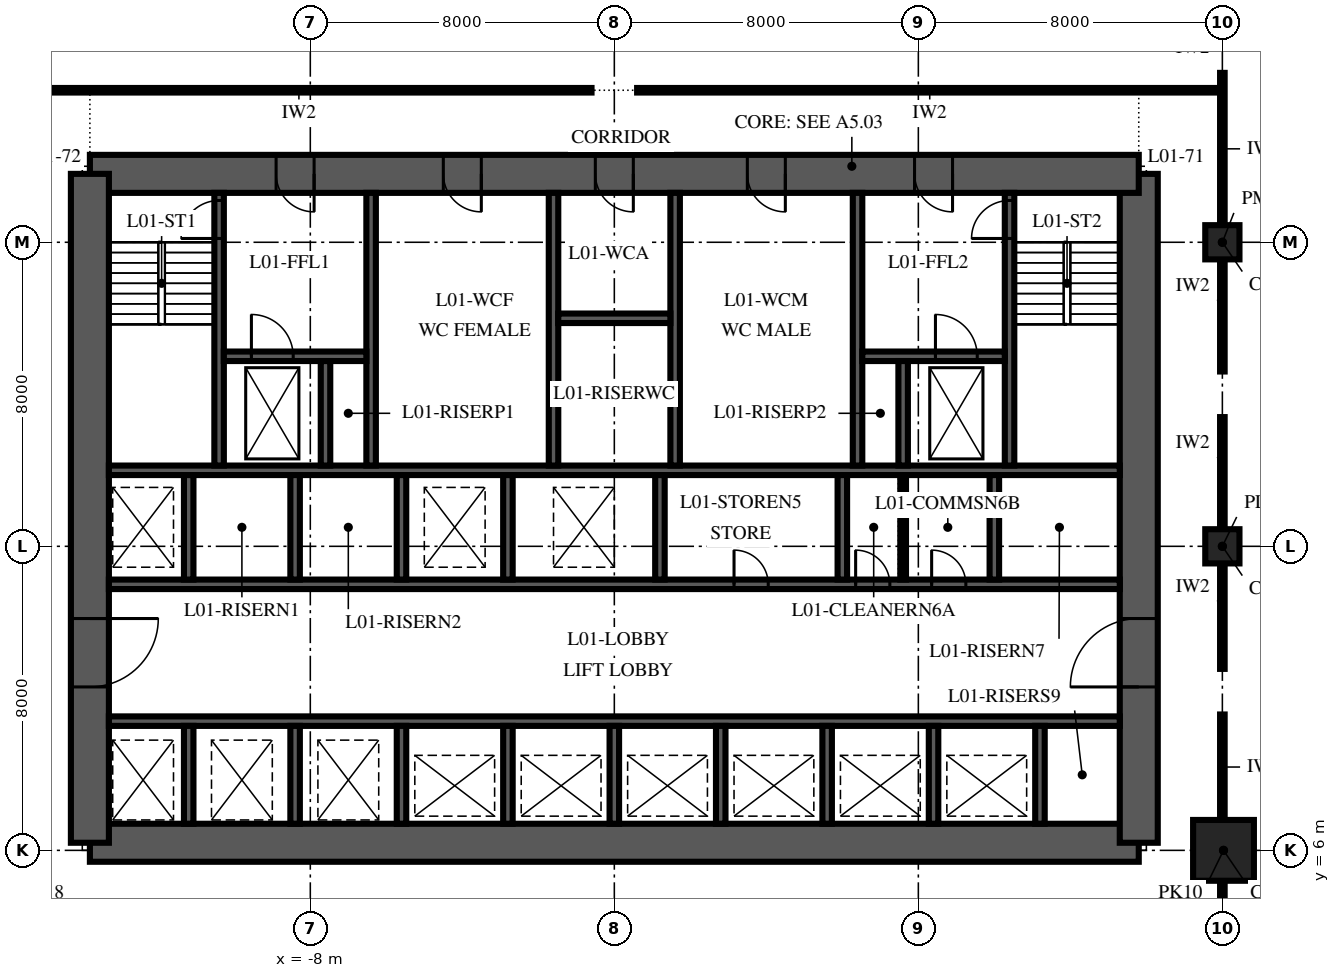
"""IFC4 building model, lengths in metres.
Left out: names, types, materials, properties, quantities, classifications, styles, units other than length and angle.
Written with IfcOpenShell. Run it as: python <this file> out.ifc"""

import sys

from ifc_helpers import new_model, si_unit, direction, frame, frame_2d, origin, origin_2d, place, context, subcontext, project, spatial, polyline, rectangle, outline, extrude, element, fill, save


model = new_model("IFC4")
c1 = context("Model", 3, precision=1e-05, world=origin(), true_north=direction((0.0, 1.0)))
c2 = subcontext(c1, "Body", "Model", "MODEL_VIEW")
j1 = project(units=[si_unit("LENGTHUNIT", "METRE"), si_unit("PLANEANGLEUNIT", "RADIAN")], contexts=[c1])
p1 = place(None, origin())
s1 = spatial("IfcSite", under=j1, at=p1, CompositionType="ELEMENT")
p2 = place(p1, origin())
s2 = spatial("IfcBuilding", under=s1, at=p2, CompositionType="ELEMENT")
p3 = place(p2, frame((0.0, 0.0, 6.0)))
s3 = spatial("IfcBuildingStorey", under=s2, at=p3, CompositionType="ELEMENT", Elevation=6.0)
p4 = place(p3, frame((16.03, 6.0, 0.0), z_axis=(0.0, 0.0, 1.0), x_axis=(1.0, 0.0, 0.0)))
e1 = element("IfcColumn", 1, at=p4, inside=s3, PredefinedType="COLUMN", context=c2, shape_type="SweptSolid", body=[
    extrude(rectangle(XDim=1.6, YDim=1.6, at=origin_2d()), origin(), (0.0, 0.0, 1.0), 6.0),
])
for number, where, z_axis, x_axis in (
    (2, (16.0, 14.0, 0.0), (0.0, 0.0, 1.0), (1.0, 0.0, 0.0)),
    (3, (16.0, 22.0, 0.0), (0.0, 0.0, 1.0), (1.0, 0.0, 0.0)),
):
    element("IfcColumn", number, at=place(p3, frame(where, z_axis=z_axis, x_axis=x_axis)), inside=s3, PredefinedType="COLUMN", context=c2, shape_type="SweptSolid", body=[
        extrude(rectangle(XDim=0.9, YDim=0.9, at=origin_2d()), origin(), (0.0, 0.0, 1.0), 6.0),
    ])
p5 = place(p3, frame((-13.8, 6.2, 0.0), z_axis=(0.0, 0.0, 1.0), x_axis=(1.0, 0.0, 0.0)))
e4 = element("IfcWall", 4, at=p5, inside=s3, PredefinedType="SHEAR", context=c2, shape_type="SweptSolid", body=[
    extrude(rectangle(XDim=27.6, YDim=1.0, at=frame_2d((13.8, 0.0))), origin(), (0.0, 0.0, 1.0), 6.0),
])
p6 = place(p3, frame((13.8, 6.2, 0.0), z_axis=(0.0, 0.0, 1.0), x_axis=(0.0, 1.0, 0.0)))
e5 = element("IfcWall", 5, at=p6, inside=s3, PredefinedType="SHEAR", context=c2, shape_type="SweptSolid", body=[
    extrude(outline(polyline([(0.0, -0.5), (17.6, -0.5), (17.6, 0.0), (17.1, 0.0), (17.1, 0.5), (0.5, 0.5), (0.5, 0.0), (0.0, 0.0), (0.0, -0.5)])), origin(), (0.0, 0.0, 1.0), 6.0),
])
p7 = place(p6, frame((4.1, 0.0, 0.0)))
e6 = element("IfcOpeningElement", 6, at=p7, cuts=e5, PredefinedType="OPENING", context=c2, shape_type="SweptSolid", body=[
    extrude(rectangle(XDim=1.8, YDim=2.4, at=frame_2d((0.9, 1.2))), frame((0.0, 0.515, 0.0), z_axis=(0.0, -1.0, 0.0), x_axis=(1.0, 0.0, 0.0)), (0.0, 0.0, 1.0), 1.03),
])
p8 = place(p3, frame((13.8, 23.8, 0.0), z_axis=(0.0, 0.0, 1.0), x_axis=(-1.0, 0.0, 0.0)))
e7 = element("IfcWall", 7, at=p8, inside=s3, PredefinedType="SHEAR", context=c2, shape_type="SweptSolid", body=[
    extrude(rectangle(XDim=27.6, YDim=1.0, at=frame_2d((13.8, 0.0))), origin(), (0.0, 0.0, 1.0), 6.0),
])
p9 = place(p8, frame((21.7, 0.0, 0.0)))
e8 = element("IfcOpeningElement", 8, at=p9, cuts=e7, PredefinedType="OPENING", context=c2, shape_type="SweptSolid", body=[
    extrude(rectangle(XDim=1.0, YDim=2.1, at=frame_2d((0.5, 1.05))), frame((0.0, 0.515, 0.0), z_axis=(0.0, -1.0, 0.0), x_axis=(1.0, 0.0, 0.0)), (0.0, 0.0, 1.0), 1.03),
])
p10 = place(p8, frame((4.9, 0.0, 0.0)))
e9 = element("IfcOpeningElement", 9, at=p10, cuts=e7, PredefinedType="OPENING", context=c2, shape_type="SweptSolid", body=[
    extrude(rectangle(XDim=1.0, YDim=2.1, at=frame_2d((0.5, 1.05))), frame((0.0, 0.515, 0.0), z_axis=(0.0, -1.0, 0.0), x_axis=(1.0, 0.0, 0.0)), (0.0, 0.0, 1.0), 1.03),
])
p11 = place(p8, frame((17.3, 0.0, 0.0)))
e10 = element("IfcOpeningElement", 10, at=p11, cuts=e7, PredefinedType="OPENING", context=c2, shape_type="SweptSolid", body=[
    extrude(rectangle(XDim=1.0, YDim=2.1, at=frame_2d((0.5, 1.05))), frame((0.0, 0.515, 0.0), z_axis=(0.0, -1.0, 0.0), x_axis=(1.0, 0.0, 0.0)), (0.0, 0.0, 1.0), 1.03),
])
p12 = place(p8, frame((13.3, 0.0, 0.0)))
e11 = element("IfcOpeningElement", 11, at=p12, cuts=e7, PredefinedType="OPENING", context=c2, shape_type="SweptSolid", body=[
    extrude(rectangle(XDim=1.0, YDim=2.1, at=frame_2d((0.5, 1.05))), frame((0.0, 0.515, 0.0), z_axis=(0.0, -1.0, 0.0), x_axis=(1.0, 0.0, 0.0)), (0.0, 0.0, 1.0), 1.03),
])
p13 = place(p8, frame((9.3, 0.0, 0.0)))
e12 = element("IfcOpeningElement", 12, at=p13, cuts=e7, PredefinedType="OPENING", context=c2, shape_type="SweptSolid", body=[
    extrude(rectangle(XDim=1.0, YDim=2.1, at=frame_2d((0.5, 1.05))), frame((0.0, 0.515, 0.0), z_axis=(0.0, -1.0, 0.0), x_axis=(1.0, 0.0, 0.0)), (0.0, 0.0, 1.0), 1.03),
])
p14 = place(p3, frame((-13.8, 23.8, 0.0), z_axis=(0.0, 0.0, 1.0), x_axis=(0.0, -1.0, 0.0)))
e13 = element("IfcWall", 13, at=p14, inside=s3, PredefinedType="SHEAR", context=c2, shape_type="SweptSolid", body=[
    extrude(outline(polyline([(0.0, -0.5), (17.6, -0.5), (17.6, 0.0), (17.1, 0.0), (17.1, 0.5), (0.5, 0.5), (0.5, 0.0), (0.0, 0.0), (0.0, -0.5)])), origin(), (0.0, 0.0, 1.0), 6.0),
])
p15 = place(p14, frame((11.7, 0.0, 0.0)))
e14 = element("IfcOpeningElement", 14, at=p15, cuts=e13, PredefinedType="OPENING", context=c2, shape_type="SweptSolid", body=[
    extrude(rectangle(XDim=1.8, YDim=2.4, at=frame_2d((0.9, 1.2))), frame((0.0, 0.515, 0.0), z_axis=(0.0, -1.0, 0.0), x_axis=(1.0, 0.0, 0.0)), (0.0, 0.0, 1.0), 1.03),
])
p16 = place(p3, frame((-13.3, 9.4, 0.0), z_axis=(0.0, 0.0, 1.0), x_axis=(1.0, 0.0, 0.0)))
e15 = element("IfcWall", 15, at=p16, inside=s3, PredefinedType="SHEAR", context=c2, shape_type="SweptSolid", body=[
    extrude(rectangle(XDim=26.6, YDim=0.25, at=frame_2d((13.3, 0.0))), origin(), (0.0, 0.0, 1.0), 6.0),
])
p17 = place(p3, frame((-13.3, 13.0, 0.0), z_axis=(0.0, 0.0, 1.0), x_axis=(1.0, 0.0, 0.0)))
e16 = element("IfcWall", 16, at=p17, inside=s3, PredefinedType="SHEAR", context=c2, shape_type="SweptSolid", body=[
    extrude(rectangle(XDim=26.6, YDim=0.25, at=frame_2d((13.3, 0.0))), origin(), (0.0, 0.0, 1.0), 6.0),
])
p18 = place(p17, frame((16.45, 0.0, 0.0)))
e17 = element("IfcOpeningElement", 17, at=p18, cuts=e16, PredefinedType="OPENING", context=c2, shape_type="SweptSolid", body=[
    extrude(rectangle(XDim=0.9, YDim=2.1, at=frame_2d((0.45, 1.05))), frame((0.0, 0.14, 0.0), z_axis=(0.0, -1.0, 0.0), x_axis=(1.0, 0.0, 0.0)), (0.0, 0.0, 1.0), 0.28),
])
p19 = place(p17, frame((19.65, 0.0, 0.0)))
e18 = element("IfcOpeningElement", 18, at=p19, cuts=e16, PredefinedType="OPENING", context=c2, shape_type="SweptSolid", body=[
    extrude(rectangle(XDim=0.9, YDim=2.1, at=frame_2d((0.45, 1.05))), frame((0.0, 0.14, 0.0), z_axis=(0.0, -1.0, 0.0), x_axis=(1.0, 0.0, 0.0)), (0.0, 0.0, 1.0), 0.28),
])
p20 = place(p17, frame((21.65, 0.0, 0.0)))
e19 = element("IfcOpeningElement", 19, at=p20, cuts=e16, PredefinedType="OPENING", context=c2, shape_type="SweptSolid", body=[
    extrude(rectangle(XDim=0.9, YDim=2.1, at=frame_2d((0.45, 1.05))), frame((0.0, 0.14, 0.0), z_axis=(0.0, -1.0, 0.0), x_axis=(1.0, 0.0, 0.0)), (0.0, 0.0, 1.0), 0.28),
])
p21 = place(p3, frame((-13.3, 16.0, 0.0), z_axis=(0.0, 0.0, 1.0), x_axis=(1.0, 0.0, 0.0)))
e20 = element("IfcWall", 20, at=p21, inside=s3, PredefinedType="SHEAR", context=c2, shape_type="SweptSolid", body=[
    extrude(rectangle(XDim=26.6, YDim=0.25, at=frame_2d((13.3, 0.0))), origin(), (0.0, 0.0, 1.0), 6.0),
])
for number, where, z_axis, x_axis in (
    (21, (-11.2, 6.7, 0.0), (0.0, 0.0, 1.0), (0.0, 1.0, 0.0)),
    (22, (-8.4, 6.7, 0.0), (0.0, 0.0, 1.0), (0.0, 1.0, 0.0)),
    (23, (-5.6, 6.7, 0.0), (0.0, 0.0, 1.0), (0.0, 1.0, 0.0)),
    (24, (-2.8, 6.7, 0.0), (0.0, 0.0, 1.0), (0.0, 1.0, 0.0)),
    (25, (0.0, 6.7, 0.0), (0.0, 0.0, 1.0), (0.0, 1.0, 0.0)),
    (26, (2.8, 6.7, 0.0), (0.0, 0.0, 1.0), (0.0, 1.0, 0.0)),
    (27, (5.6, 6.7, 0.0), (0.0, 0.0, 1.0), (0.0, 1.0, 0.0)),
    (28, (8.4, 6.7, 0.0), (0.0, 0.0, 1.0), (0.0, 1.0, 0.0)),
    (29, (11.2, 6.7, 0.0), (0.0, 0.0, 1.0), (0.0, 1.0, 0.0)),
):
    element("IfcWall", number, at=place(p3, frame(where, z_axis=z_axis, x_axis=x_axis)), inside=s3, PredefinedType="SHEAR", context=c2, shape_type="SweptSolid", body=[
        extrude(rectangle(XDim=2.575, YDim=0.25, at=frame_2d((1.288, 0.0))), origin(), (0.0, 0.0, 1.0), 6.0),
    ])
for number, where, z_axis, x_axis in (
    (30, (-11.2, 13.125, 0.0), (0.0, 0.0, 1.0), (0.0, 1.0, 0.0)),
    (31, (-8.4, 13.125, 0.0), (0.0, 0.0, 1.0), (0.0, 1.0, 0.0)),
    (32, (-5.6, 13.125, 0.0), (0.0, 0.0, 1.0), (0.0, 1.0, 0.0)),
    (33, (-2.8, 13.125, 0.0), (0.0, 0.0, 1.0), (0.0, 1.0, 0.0)),
    (34, (1.2, 13.125, 0.0), (0.0, 0.0, 1.0), (0.0, 1.0, 0.0)),
    (35, (6.0, 13.125, 0.0), (0.0, 0.0, 1.0), (0.0, 1.0, 0.0)),
    (36, (10.0, 13.125, 0.0), (0.0, 0.0, 1.0), (0.0, 1.0, 0.0)),
):
    element("IfcWall", number, at=place(p3, frame(where, z_axis=z_axis, x_axis=x_axis)), inside=s3, PredefinedType="SHEAR", context=c2, shape_type="SweptSolid", body=[
        extrude(rectangle(XDim=2.75, YDim=0.25, at=frame_2d((1.375, 0.0))), origin(), (0.0, 0.0, 1.0), 6.0),
    ])
p22 = place(p3, frame((-10.4, 16.125, 0.0), z_axis=(0.0, 0.0, 1.0), x_axis=(0.0, 1.0, 0.0)))
e37 = element("IfcWall", 37, at=p22, inside=s3, PredefinedType="SHEAR", context=c2, shape_type="SweptSolid", body=[
    extrude(rectangle(XDim=7.175, YDim=0.25, at=frame_2d((3.587, 0.0))), origin(), (0.0, 0.0, 1.0), 6.0),
])
p23 = place(p22, frame((5.975, 0.0, 0.0)))
e38 = element("IfcOpeningElement", 38, at=p23, cuts=e37, PredefinedType="OPENING", context=c2, shape_type="SweptSolid", body=[
    extrude(rectangle(XDim=1.0, YDim=2.1, at=frame_2d((0.5, 1.05))), frame((0.0, 0.14, 0.0), z_axis=(0.0, -1.0, 0.0), x_axis=(1.0, 0.0, 0.0)), (0.0, 0.0, 1.0), 0.28),
])
for number, where, z_axis, x_axis in (
    (39, (-6.4, 16.125, 0.0), (0.0, 0.0, 1.0), (0.0, 1.0, 0.0)),
    (40, (-1.6, 16.125, 0.0), (0.0, 0.0, 1.0), (0.0, 1.0, 0.0)),
    (41, (1.6, 16.125, 0.0), (0.0, 0.0, 1.0), (0.0, 1.0, 0.0)),
    (42, (6.4, 16.125, 0.0), (0.0, 0.0, 1.0), (0.0, 1.0, 0.0)),
):
    element("IfcWall", number, at=place(p3, frame(where, z_axis=z_axis, x_axis=x_axis)), inside=s3, PredefinedType="SHEAR", context=c2, shape_type="SweptSolid", body=[
        extrude(rectangle(XDim=7.175, YDim=0.25, at=frame_2d((3.587, 0.0))), origin(), (0.0, 0.0, 1.0), 6.0),
    ])
p24 = place(p3, frame((10.4, 16.125, 0.0), z_axis=(0.0, 0.0, 1.0), x_axis=(0.0, 1.0, 0.0)))
e43 = element("IfcWall", 43, at=p24, inside=s3, PredefinedType="SHEAR", context=c2, shape_type="SweptSolid", body=[
    extrude(rectangle(XDim=7.175, YDim=0.25, at=frame_2d((3.587, 0.0))), origin(), (0.0, 0.0, 1.0), 6.0),
])
p25 = place(p24, frame((5.975, 0.0, 0.0)))
e44 = element("IfcOpeningElement", 44, at=p25, cuts=e43, PredefinedType="OPENING", context=c2, shape_type="SweptSolid", body=[
    extrude(rectangle(XDim=1.0, YDim=2.1, at=frame_2d((0.5, 1.05))), frame((0.0, 0.14, 0.0), z_axis=(0.0, -1.0, 0.0), x_axis=(1.0, 0.0, 0.0)), (0.0, 0.0, 1.0), 0.28),
])
p26 = place(p3, frame((-10.275, 19.0, 0.0), z_axis=(0.0, 0.0, 1.0), x_axis=(1.0, 0.0, 0.0)))
e45 = element("IfcWall", 45, at=p26, inside=s3, PredefinedType="SHEAR", context=c2, shape_type="SweptSolid", body=[
    extrude(rectangle(XDim=3.75, YDim=0.25, at=frame_2d((1.875, 0.0))), origin(), (0.0, 0.0, 1.0), 6.0),
])
p27 = place(p26, frame((0.725, 0.0, 0.0)))
e46 = element("IfcOpeningElement", 46, at=p27, cuts=e45, PredefinedType="OPENING", context=c2, shape_type="SweptSolid", body=[
    extrude(rectangle(XDim=1.1, YDim=2.1, at=frame_2d((0.55, 1.05))), frame((0.0, 0.14, 0.0), z_axis=(0.0, -1.0, 0.0), x_axis=(1.0, 0.0, 0.0)), (0.0, 0.0, 1.0), 0.28),
])
p28 = place(p3, frame((6.525, 19.0, 0.0), z_axis=(0.0, 0.0, 1.0), x_axis=(1.0, 0.0, 0.0)))
e47 = element("IfcWall", 47, at=p28, inside=s3, PredefinedType="SHEAR", context=c2, shape_type="SweptSolid", body=[
    extrude(rectangle(XDim=3.75, YDim=0.25, at=frame_2d((1.875, 0.0))), origin(), (0.0, 0.0, 1.0), 6.0),
])
p29 = place(p28, frame((1.925, 0.0, 0.0)))
e48 = element("IfcOpeningElement", 48, at=p29, cuts=e47, PredefinedType="OPENING", context=c2, shape_type="SweptSolid", body=[
    extrude(rectangle(XDim=1.1, YDim=2.1, at=frame_2d((0.55, 1.05))), frame((0.0, 0.14, 0.0), z_axis=(0.0, -1.0, 0.0), x_axis=(1.0, 0.0, 0.0)), (0.0, 0.0, 1.0), 0.28),
])
for number, where, z_axis, x_axis in (
    (49, (-7.6, 16.125, 0.0), (0.0, 0.0, 1.0), (0.0, 1.0, 0.0)),
    (50, (7.6, 16.125, 0.0), (0.0, 0.0, 1.0), (0.0, 1.0, 0.0)),
):
    element("IfcWall", number, at=place(p3, frame(where, z_axis=z_axis, x_axis=x_axis)), inside=s3, PredefinedType="SHEAR", context=c2, shape_type="SweptSolid", body=[
        extrude(rectangle(XDim=2.75, YDim=0.25, at=frame_2d((1.375, 0.0))), origin(), (0.0, 0.0, 1.0), 6.0),
    ])
p30 = place(p3, frame((-1.475, 20.0, 0.0), z_axis=(0.0, 0.0, 1.0), x_axis=(1.0, 0.0, 0.0)))
e51 = element("IfcWall", 51, at=p30, inside=s3, PredefinedType="SHEAR", context=c2, shape_type="SweptSolid", body=[
    extrude(rectangle(XDim=2.95, YDim=0.25, at=frame_2d((1.475, 0.0))), origin(), (0.0, 0.0, 1.0), 6.0),
])
p31 = place(p3, frame((7.6, 13.125, 0.0), z_axis=(0.0, 0.0, 1.0), x_axis=(0.0, 1.0, 0.0)))
e52 = element("IfcWall", 52, at=p31, inside=s3, PredefinedType="PARTITIONING", context=c2, shape_type="SweptSolid", body=[
    extrude(rectangle(XDim=2.75, YDim=0.15, at=frame_2d((1.375, 0.0))), origin(), (0.0, 0.0, 1.0), 5.85),
])
for number, where, z_axis, x_axis in (
    (53, (16.0, 2.425, 0.0), (0.0, 0.0, 1.0), (0.0, 1.0, 0.0)),
    (54, (16.0, 6.81, 0.0), (0.0, 0.0, 1.0), (0.0, 1.0, 0.0)),
):
    element("IfcWall", number, at=place(p3, frame(where, z_axis=z_axis, x_axis=x_axis)), inside=s3, PredefinedType="PARTITIONING", context=c2, shape_type="SweptSolid", body=[
        extrude(rectangle(XDim=2.765, YDim=0.12, at=frame_2d((1.382, 0.0))), origin(), (0.0, 0.0, 1.0), 5.05),
    ])
p32 = place(p3, frame((16.0, 10.775, 0.0), z_axis=(0.0, 0.0, 1.0), x_axis=(0.0, 1.0, 0.0)))
e55 = element("IfcWall", 55, at=p32, inside=s3, PredefinedType="PARTITIONING", context=c2, shape_type="SweptSolid", body=[
    extrude(rectangle(XDim=2.765, YDim=0.12, at=frame_2d((1.383, 0.0))), origin(), (0.0, 0.0, 1.0), 5.05),
])
for number, where, z_axis, x_axis in (
    (56, (16.0, 14.46, 0.0), (0.0, 0.0, 1.0), (0.0, 1.0, 0.0)),
    (57, (16.0, 18.6, 0.0), (0.0, 0.0, 1.0), (0.0, 1.0, 0.0)),
):
    element("IfcWall", number, at=place(p3, frame(where, z_axis=z_axis, x_axis=x_axis)), inside=s3, PredefinedType="PARTITIONING", context=c2, shape_type="SweptSolid", body=[
        extrude(rectangle(XDim=2.94, YDim=0.12, at=frame_2d((1.47, 0.0))), origin(), (0.0, 0.0, 1.0), 5.05),
    ])
p33 = place(p3, frame((16.0, 22.46, 0.0), z_axis=(0.0, 0.0, 1.0), x_axis=(0.0, 1.0, 0.0)))
e58 = element("IfcWall", 58, at=p33, inside=s3, PredefinedType="PARTITIONING", context=c2, shape_type="SweptSolid", body=[
    extrude(rectangle(XDim=3.998, YDim=0.12, at=frame_2d((1.999, 0.0))), origin(), (0.0, 0.0, 1.0), 5.7),
])
for number, where, z_axis, x_axis in (
    (59, (-16.0, 26.0, 0.0), (0.0, 0.0, 1.0), (1.0, 0.0, 0.0)),
    (60, (0.6, 26.0, 0.0), (0.0, 0.0, 1.0), (1.0, 0.0, 0.0)),
):
    element("IfcWall", number, at=place(p3, frame(where, z_axis=z_axis, x_axis=x_axis)), inside=s3, PredefinedType="PARTITIONING", context=c2, shape_type="SweptSolid", body=[
        extrude(rectangle(XDim=15.4, YDim=0.12, at=frame_2d((7.7, 0.0))), origin(), (0.0, 0.0, 1.0), 5.7),
    ])
p34 = place(p7, origin())
e61 = element("IfcDoor", 61, at=p34, inside=s3, OperationType="DOUBLE_DOOR_SINGLE_SWING", PredefinedType="DOOR", context=c2, shape_type="SweptSolid", body=[
    extrude(rectangle(XDim=1.8, YDim=2.4, at=frame_2d((0.9, 1.2))), frame((0.0, 0.5, 0.0), z_axis=(0.0, -1.0, 0.0), x_axis=(1.0, 0.0, 0.0)), (0.0, 0.0, 1.0), 1.0),
])
fill(e6, e61)
p35 = place(p15, origin())
e62 = element("IfcDoor", 62, at=p35, inside=s3, OperationType="DOUBLE_DOOR_SINGLE_SWING", PredefinedType="DOOR", context=c2, shape_type="SweptSolid", body=[
    extrude(rectangle(XDim=1.8, YDim=2.4, at=frame_2d((0.9, 1.2))), frame((0.0, 0.5, 0.0), z_axis=(0.0, -1.0, 0.0), x_axis=(1.0, 0.0, 0.0)), (0.0, 0.0, 1.0), 1.0),
])
fill(e14, e62)
p36 = place(p9, origin())
e63 = element("IfcDoor", 63, at=p36, inside=s3, OperationType="SINGLE_SWING_RIGHT", PredefinedType="DOOR", context=c2, shape_type="SweptSolid", body=[
    extrude(rectangle(XDim=1.0, YDim=2.1, at=frame_2d((0.5, 1.05))), frame((0.0, 0.5, 0.0), z_axis=(0.0, -1.0, 0.0), x_axis=(1.0, 0.0, 0.0)), (0.0, 0.0, 1.0), 1.0),
])
fill(e8, e63)
p37 = place(p10, origin())
e64 = element("IfcDoor", 64, at=p37, inside=s3, OperationType="SINGLE_SWING_RIGHT", PredefinedType="DOOR", context=c2, shape_type="SweptSolid", body=[
    extrude(rectangle(XDim=1.0, YDim=2.1, at=frame_2d((0.5, 1.05))), frame((0.0, 0.5, 0.0), z_axis=(0.0, -1.0, 0.0), x_axis=(1.0, 0.0, 0.0)), (0.0, 0.0, 1.0), 1.0),
])
fill(e9, e64)
p38 = place(p11, origin())
e65 = element("IfcDoor", 65, at=p38, inside=s3, OperationType="SINGLE_SWING_LEFT", PredefinedType="DOOR", context=c2, shape_type="SweptSolid", body=[
    extrude(rectangle(XDim=1.0, YDim=2.1, at=frame_2d((0.5, 1.05))), frame((0.0, 0.5, 0.0), z_axis=(0.0, -1.0, 0.0), x_axis=(1.0, 0.0, 0.0)), (0.0, 0.0, 1.0), 1.0),
])
fill(e10, e65)
p39 = place(p12, origin())
e66 = element("IfcDoor", 66, at=p39, inside=s3, OperationType="SINGLE_SWING_LEFT", PredefinedType="DOOR", context=c2, shape_type="SweptSolid", body=[
    extrude(rectangle(XDim=1.0, YDim=2.1, at=frame_2d((0.5, 1.05))), frame((0.0, 0.5, 0.0), z_axis=(0.0, -1.0, 0.0), x_axis=(1.0, 0.0, 0.0)), (0.0, 0.0, 1.0), 1.0),
])
fill(e11, e66)
p40 = place(p13, origin())
e67 = element("IfcDoor", 67, at=p40, inside=s3, OperationType="SINGLE_SWING_LEFT", PredefinedType="DOOR", context=c2, shape_type="SweptSolid", body=[
    extrude(rectangle(XDim=1.0, YDim=2.1, at=frame_2d((0.5, 1.05))), frame((0.0, 0.5, 0.0), z_axis=(0.0, -1.0, 0.0), x_axis=(1.0, 0.0, 0.0)), (0.0, 0.0, 1.0), 1.0),
])
fill(e12, e67)
p41 = place(p23, origin())
e68 = element("IfcDoor", 68, at=p41, inside=s3, OperationType="SINGLE_SWING_LEFT", PredefinedType="DOOR", context=c2, shape_type="SweptSolid", body=[
    extrude(rectangle(XDim=1.0, YDim=2.1, at=frame_2d((0.5, 1.05))), frame((0.0, 0.125, 0.0), z_axis=(0.0, -1.0, 0.0), x_axis=(1.0, 0.0, 0.0)), (0.0, 0.0, 1.0), 0.25),
])
fill(e38, e68)
p42 = place(p25, origin())
e69 = element("IfcDoor", 69, at=p42, inside=s3, OperationType="SINGLE_SWING_LEFT", PredefinedType="DOOR", context=c2, shape_type="SweptSolid", body=[
    extrude(rectangle(XDim=1.0, YDim=2.1, at=frame_2d((0.5, 1.05))), frame((0.0, 0.125, 0.0), z_axis=(0.0, -1.0, 0.0), x_axis=(1.0, 0.0, 0.0)), (0.0, 0.0, 1.0), 0.25),
])
fill(e44, e69)
p43 = place(p29, origin())
e70 = element("IfcDoor", 70, at=p43, inside=s3, OperationType="SLIDING_TO_RIGHT", PredefinedType="DOOR", context=c2, shape_type="SweptSolid", body=[
    extrude(rectangle(XDim=1.1, YDim=2.1, at=frame_2d((0.55, 1.05))), frame((0.0, 0.125, 0.0), z_axis=(0.0, -1.0, 0.0), x_axis=(1.0, 0.0, 0.0)), (0.0, 0.0, 1.0), 0.25),
])
fill(e48, e70)
p44 = place(p27, origin())
e71 = element("IfcDoor", 71, at=p44, inside=s3, OperationType="SLIDING_TO_RIGHT", PredefinedType="DOOR", context=c2, shape_type="SweptSolid", body=[
    extrude(rectangle(XDim=1.1, YDim=2.1, at=frame_2d((0.55, 1.05))), frame((0.0, 0.125, 0.0), z_axis=(0.0, -1.0, 0.0), x_axis=(1.0, 0.0, 0.0)), (0.0, 0.0, 1.0), 0.25),
])
fill(e46, e71)
p45 = place(p18, origin())
e72 = element("IfcDoor", 72, at=p45, inside=s3, OperationType="SINGLE_SWING_LEFT", PredefinedType="DOOR", context=c2, shape_type="SweptSolid", body=[
    extrude(rectangle(XDim=0.9, YDim=2.1, at=frame_2d((0.45, 1.05))), frame((0.0, 0.125, 0.0), z_axis=(0.0, -1.0, 0.0), x_axis=(1.0, 0.0, 0.0)), (0.0, 0.0, 1.0), 0.25),
])
fill(e17, e72)
p46 = place(p19, origin())
e73 = element("IfcDoor", 73, at=p46, inside=s3, OperationType="SINGLE_SWING_LEFT", PredefinedType="DOOR", context=c2, shape_type="SweptSolid", body=[
    extrude(rectangle(XDim=0.9, YDim=2.1, at=frame_2d((0.45, 1.05))), frame((0.0, 0.125, 0.0), z_axis=(0.0, -1.0, 0.0), x_axis=(1.0, 0.0, 0.0)), (0.0, 0.0, 1.0), 0.25),
])
fill(e18, e73)
p47 = place(p20, origin())
e74 = element("IfcDoor", 74, at=p47, inside=s3, OperationType="SINGLE_SWING_LEFT", PredefinedType="DOOR", context=c2, shape_type="SweptSolid", body=[
    extrude(rectangle(XDim=0.9, YDim=2.1, at=frame_2d((0.45, 1.05))), frame((0.0, 0.125, 0.0), z_axis=(0.0, -1.0, 0.0), x_axis=(1.0, 0.0, 0.0)), (0.0, 0.0, 1.0), 0.25),
])
fill(e19, e74)
save(model, sys.argv[1])
